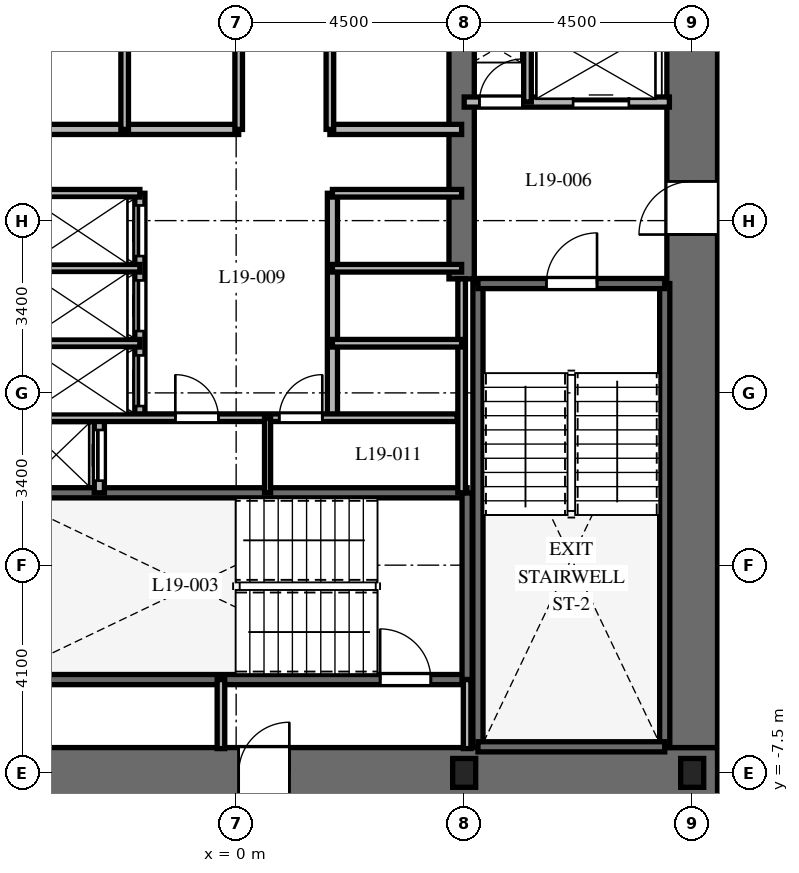
"""IFC4 building model, lengths in metres.
Left out: names, types, materials, properties, quantities, classifications, styles, units other than length and angle.
Written with IfcOpenShell. Run it as: python <this file> out.ifc"""

import sys

from ifc_helpers import new_model, si_unit, direction, frame, frame_2d, origin, origin_2d, place, context, subcontext, project, spatial, rectangle, i_section, extrude, element, fill, save


model = new_model("IFC4")
c1 = context("Model", 3, precision=1e-05, world=origin(), true_north=direction((0.0, 1.0)))
c2 = subcontext(c1, "Body", "Model", "MODEL_VIEW")
j1 = project(units=[si_unit("LENGTHUNIT", "METRE"), si_unit("PLANEANGLEUNIT", "RADIAN")], contexts=[c1])
p1 = place(None, origin())
s1 = spatial("IfcSite", under=j1, at=p1, CompositionType="ELEMENT")
p2 = place(p1, origin())
s2 = spatial("IfcBuilding", under=s1, at=p2, CompositionType="ELEMENT")
p3 = place(p2, frame((0.0, 0.0, 82.3)))
s3 = spatial("IfcBuildingStorey", under=s2, at=p3, CompositionType="ELEMENT", Elevation=82.3)
p4 = place(p3, frame((-9.5, -7.5, 0.0), z_axis=(0.0, 0.0, 1.0), x_axis=(1.0, 0.0, 0.0)))
e1 = element("IfcWall", 1, at=p4, inside=s3, PredefinedType="SHEAR", context=c2, shape_type="SweptSolid", body=[
    extrude(rectangle(XDim=19.0, YDim=1.0, at=frame_2d((9.5, 0.0))), origin(), (0.0, 0.0, 1.0), 3.7),
])
p5 = place(p4, frame((9.55, 0.0, 0.0)))
e2 = element("IfcOpeningElement", 2, at=p5, cuts=e1, PredefinedType="OPENING", context=c2, shape_type="SweptSolid", body=[
    extrude(rectangle(XDim=1.0, YDim=2.15, at=frame_2d((0.5, 1.075))), frame((0.0, 0.51, 0.0), z_axis=(0.0, -1.0, 0.0), x_axis=(1.0, 0.0, 0.0)), (0.0, 0.0, 1.0), 1.02),
])
p6 = place(p3, frame((9.0, -7.0, 0.0), z_axis=(0.0, 0.0, 1.0), x_axis=(0.0, 1.0, 0.0)))
e3 = element("IfcWall", 3, at=p6, inside=s3, PredefinedType="SHEAR", context=c2, shape_type="SweptSolid", body=[
    extrude(rectangle(XDim=14.0, YDim=1.0, at=frame_2d((7.0, 0.0))), origin(), (0.0, 0.0, 1.0), 3.7),
])
p7 = place(p6, frame((10.125, 0.0, 0.0)))
e4 = element("IfcOpeningElement", 4, at=p7, cuts=e3, PredefinedType="OPENING", context=c2, shape_type="SweptSolid", body=[
    extrude(rectangle(XDim=1.05, YDim=2.15, at=frame_2d((0.525, 1.075))), frame((0.0, 0.51, 0.0), z_axis=(0.0, -1.0, 0.0), x_axis=(1.0, 0.0, 0.0)), (0.0, 0.0, 1.0), 1.02),
])
p8 = place(p3, frame((4.45, 2.25, 0.0), z_axis=(0.0, 0.0, 1.0), x_axis=(0.0, 1.0, 0.0)))
e5 = element("IfcWall", 5, at=p8, inside=s3, PredefinedType="SHEAR", context=c2, shape_type="SweptSolid", body=[
    extrude(rectangle(XDim=4.75, YDim=0.5, at=frame_2d((2.375, 0.0))), origin(), (0.0, 0.0, 1.0), 3.7),
])
for number, where, z_axis, x_axis in (
    (6, (4.772, -6.985, 0.0), (0.0, 0.0, 1.0), (0.0, 1.0, 0.0)),
    (7, (8.458, -6.985, 0.0), (0.0, 0.0, 1.0), (0.0, 1.0, 0.0)),
):
    element("IfcWall", number, at=place(p3, frame(where, z_axis=z_axis, x_axis=x_axis)), inside=s3, PredefinedType="SHEAR", context=c2, shape_type="SweptSolid", body=[
        extrude(rectangle(XDim=9.143, YDim=0.2, at=frame_2d((4.572, 0.0))), origin(), (0.0, 0.0, 1.0), 3.7),
    ])
p9 = place(p3, frame((4.772, -6.985, 0.0), z_axis=(0.0, 0.0, 1.0), x_axis=(1.0, 0.0, 0.0)))
e8 = element("IfcWall", 8, at=p9, inside=s3, PredefinedType="SHEAR", context=c2, shape_type="SweptSolid", body=[
    extrude(rectangle(XDim=3.686, YDim=0.2, at=frame_2d((1.843, 0.0))), origin(), (0.0, 0.0, 1.0), 3.7),
])
p10 = place(p3, frame((4.772, 2.158, 0.0), z_axis=(0.0, 0.0, 1.0), x_axis=(1.0, 0.0, 0.0)))
e9 = element("IfcWall", 9, at=p10, inside=s3, PredefinedType="SHEAR", context=c2, shape_type="SweptSolid", body=[
    extrude(rectangle(XDim=3.686, YDim=0.2, at=frame_2d((1.843, 0.0))), origin(), (0.0, 0.0, 1.0), 3.7),
])
p11 = place(p10, frame((1.35, 0.0, 0.0)))
e10 = element("IfcOpeningElement", 10, at=p11, cuts=e9, PredefinedType="OPENING", context=c2, shape_type="SweptSolid", body=[
    extrude(rectangle(XDim=1.0, YDim=2.15, at=frame_2d((0.5, 1.075))), frame((0.0, 0.11, 0.0), z_axis=(0.0, -1.0, 0.0), x_axis=(1.0, 0.0, 0.0)), (0.0, 0.0, 1.0), 0.22),
])
p12 = place(p3, frame((-4.608, -5.658, 0.0), z_axis=(0.0, 0.0, 1.0), x_axis=(1.0, 0.0, 0.0)))
e11 = element("IfcWall", 11, at=p12, inside=s3, PredefinedType="SHEAR", context=c2, shape_type="SweptSolid", body=[
    extrude(rectangle(XDim=9.166, YDim=0.2, at=frame_2d((4.583, 0.0))), origin(), (0.0, 0.0, 1.0), 3.7),
])
p13 = place(p12, frame((7.45, 0.0, 0.0)))
e12 = element("IfcOpeningElement", 12, at=p13, cuts=e11, PredefinedType="OPENING", context=c2, shape_type="SweptSolid", body=[
    extrude(rectangle(XDim=1.0, YDim=2.15, at=frame_2d((0.5, 1.075))), frame((0.0, 0.11, 0.0), z_axis=(0.0, -1.0, 0.0), x_axis=(1.0, 0.0, 0.0)), (0.0, 0.0, 1.0), 0.22),
])
p14 = place(p3, frame((-4.608, -1.972, 0.0), z_axis=(0.0, 0.0, 1.0), x_axis=(1.0, 0.0, 0.0)))
e13 = element("IfcWall", 13, at=p14, inside=s3, PredefinedType="SHEAR", context=c2, shape_type="SweptSolid", body=[
    extrude(rectangle(XDim=9.166, YDim=0.2, at=frame_2d((4.583, 0.0))), origin(), (0.0, 0.0, 1.0), 3.7),
])
p15 = place(p3, frame((4.558, -5.658, 0.0), z_axis=(0.0, 0.0, 1.0), x_axis=(0.0, 1.0, 0.0)))
e14 = element("IfcWall", 14, at=p15, inside=s3, PredefinedType="SHEAR", context=c2, shape_type="SweptSolid", body=[
    extrude(rectangle(XDim=3.686, YDim=0.2, at=frame_2d((1.843, 0.0))), origin(), (0.0, 0.0, 1.0), 3.7),
])
for number, where, z_axis, x_axis in (
    (15, (4.5, -7.5, 0.0), (0.0, 0.0, 1.0), (1.0, 0.0, 0.0)),
    (16, (9.0, -7.5, 0.0), (0.0, 0.0, 1.0), (1.0, 0.0, 0.0)),
):
    element("IfcColumn", number, at=place(p3, frame(where, z_axis=z_axis, x_axis=x_axis)), inside=s3, PredefinedType="COLUMN", context=c2, shape_type="SweptSolid", body=[
        extrude(i_section(OverallWidth=0.454, OverallDepth=0.569, WebThickness=0.078, FlangeThickness=0.125, at=origin_2d()), origin(), (0.0, 0.0, 1.0), 3.7),
    ])
for number, where, z_axis, x_axis in (
    (17, (-0.3, -7.02, 0.0), (0.0, 0.0, 1.0), (0.0, 1.0, 0.0)),
    (18, (4.558, -7.02, 0.0), (0.0, 0.0, 1.0), (0.0, 1.0, 0.0)),
):
    element("IfcWall", number, at=place(p3, frame(where, z_axis=z_axis, x_axis=x_axis)), inside=s3, PredefinedType="PARTITIONING", context=c2, shape_type="SweptSolid", body=[
        extrude(rectangle(XDim=1.362, YDim=0.15, at=frame_2d((0.681, 0.0))), origin(), (0.0, 0.0, 1.0), 3.38),
    ])
p16 = place(p3, frame((4.5, 5.74, 0.0), z_axis=(0.0, 0.0, 1.0), x_axis=(1.0, 0.0, 0.0)))
e19 = element("IfcWall", 19, at=p16, inside=s3, PredefinedType="PARTITIONING", context=c2, shape_type="SweptSolid", body=[
    extrude(rectangle(XDim=4.05, YDim=0.2, at=frame_2d((2.025, 0.0))), origin(), (0.0, 0.0, 1.0), 3.38),
])
p17 = place(p16, frame((0.3, 0.0, 0.0)))
e20 = element("IfcOpeningElement", 20, at=p17, cuts=e19, PredefinedType="OPENING", context=c2, shape_type="SweptSolid", body=[
    extrude(rectangle(XDim=0.85, YDim=2.03, at=frame_2d((0.425, 1.015))), frame((0.0, 0.11, 0.0), z_axis=(0.0, -1.0, 0.0), x_axis=(1.0, 0.0, 0.0)), (0.0, 0.0, 1.0), 0.22),
])
p18 = place(p16, frame((2.15, 0.0, 0.0)))
e21 = element("IfcOpeningElement", 21, at=p18, cuts=e19, PredefinedType="OPENING", context=c2, shape_type="SweptSolid", body=[
    extrude(rectangle(XDim=1.1, YDim=2.2, at=frame_2d((0.55, 1.1))), frame((0.0, 0.11, 0.0), z_axis=(0.0, -1.0, 0.0), x_axis=(1.0, 0.0, 0.0)), (0.0, 0.0, 1.0), 0.22),
])
p19 = place(p3, frame((5.75, 5.74, 0.0), z_axis=(0.0, 0.0, 1.0), x_axis=(0.0, 1.0, 0.0)))
e22 = element("IfcWall", 22, at=p19, inside=s3, PredefinedType="PARTITIONING", context=c2, shape_type="SweptSolid", body=[
    extrude(rectangle(XDim=1.41, YDim=0.15, at=frame_2d((0.705, 0.0))), origin(), (0.0, 0.0, 1.0), 3.38),
])
p20 = place(p3, frame((-2.7, -1.972, 0.0), z_axis=(0.0, 0.0, 1.0), x_axis=(0.0, 1.0, 0.0)))
e23 = element("IfcWall", 23, at=p20, inside=s3, PredefinedType="PARTITIONING", context=c2, shape_type="SweptSolid", body=[
    extrude(rectangle(XDim=1.472, YDim=0.2, at=frame_2d((0.736, 0.0))), origin(), (0.0, 0.0, 1.0), 3.38),
])
p21 = place(p20, frame((0.24, 0.0, 0.0)))
e24 = element("IfcOpeningElement", 24, at=p21, cuts=e23, PredefinedType="OPENING", context=c2, shape_type="SweptSolid", body=[
    extrude(rectangle(XDim=1.0, YDim=2.2, at=frame_2d((0.5, 1.1))), frame((0.0, 0.11, 0.0), z_axis=(0.0, -1.0, 0.0), x_axis=(1.0, 0.0, 0.0)), (0.0, 0.0, 1.0), 0.22),
])
p22 = place(p3, frame((-4.45, 5.2, 0.0), z_axis=(0.0, 0.0, 1.0), x_axis=(1.0, 0.0, 0.0)))
e25 = element("IfcWall", 25, at=p22, inside=s3, PredefinedType="PARTITIONING", context=c2, shape_type="SweptSolid", body=[
    extrude(rectangle(XDim=4.5, YDim=0.2, at=frame_2d((2.25, 0.0))), origin(), (0.0, 0.0, 1.0), 3.38),
])
p23 = place(p3, frame((1.85, 5.2, 0.0), z_axis=(0.0, 0.0, 1.0), x_axis=(1.0, 0.0, 0.0)))
e26 = element("IfcWall", 26, at=p23, inside=s3, PredefinedType="PARTITIONING", context=c2, shape_type="SweptSolid", body=[
    extrude(rectangle(XDim=2.6, YDim=0.2, at=frame_2d((1.3, 0.0))), origin(), (0.0, 0.0, 1.0), 3.38),
])
p24 = place(p3, frame((-2.2, 5.2, 0.0), z_axis=(0.0, 0.0, 1.0), x_axis=(0.0, 1.0, 0.0)))
e27 = element("IfcWall", 27, at=p24, inside=s3, PredefinedType="PARTITIONING", context=c2, shape_type="SweptSolid", body=[
    extrude(rectangle(XDim=1.85, YDim=0.15, at=frame_2d((0.925, 0.0))), origin(), (0.0, 0.0, 1.0), 3.38),
])
for number, where, z_axis, x_axis in (
    (28, (0.05, 5.2, 0.0), (0.0, 0.0, 1.0), (0.0, 1.0, 0.0)),
    (29, (1.85, 5.2, 0.0), (0.0, 0.0, 1.0), (0.0, 1.0, 0.0)),
):
    element("IfcWall", number, at=place(p3, frame(where, z_axis=z_axis, x_axis=x_axis)), inside=s3, PredefinedType="PARTITIONING", context=c2, shape_type="SweptSolid", body=[
        extrude(rectangle(XDim=1.95, YDim=0.15, at=frame_2d((0.975, 0.0))), origin(), (0.0, 0.0, 1.0), 3.38),
    ])
p25 = place(p3, frame((4.45, -1.972, 0.0), z_axis=(0.0, 0.0, 1.0), x_axis=(0.0, 1.0, 0.0)))
e30 = element("IfcWall", 30, at=p25, inside=s3, PredefinedType="PARTITIONING", context=c2, shape_type="SweptSolid", body=[
    extrude(rectangle(XDim=4.222, YDim=0.15, at=frame_2d((2.111, 0.0))), origin(), (0.0, 0.0, 1.0), 3.38),
])
p26 = place(p3, frame((-1.9, -0.5, 0.0), z_axis=(0.0, 0.0, 1.0), x_axis=(0.0, 1.0, 0.0)))
e31 = element("IfcWall", 31, at=p26, inside=s3, PredefinedType="PARTITIONING", context=c2, shape_type="SweptSolid", body=[
    extrude(rectangle(XDim=4.44, YDim=0.2, at=frame_2d((2.22, 0.0))), origin(), (0.0, 0.0, 1.0), 3.38),
])
p27 = place(p26, frame((0.24, 0.0, 0.0)))
e32 = element("IfcOpeningElement", 32, at=p27, cuts=e31, PredefinedType="OPENING", context=c2, shape_type="SweptSolid", body=[
    extrude(rectangle(XDim=1.0, YDim=2.2, at=frame_2d((0.5, 1.1))), frame((0.0, 0.11, 0.0), z_axis=(0.0, -1.0, 0.0), x_axis=(1.0, 0.0, 0.0)), (0.0, 0.0, 1.0), 0.22),
])
p28 = place(p26, frame((1.72, 0.0, 0.0)))
e33 = element("IfcOpeningElement", 33, at=p28, cuts=e31, PredefinedType="OPENING", context=c2, shape_type="SweptSolid", body=[
    extrude(rectangle(XDim=1.0, YDim=2.2, at=frame_2d((0.5, 1.1))), frame((0.0, 0.11, 0.0), z_axis=(0.0, -1.0, 0.0), x_axis=(1.0, 0.0, 0.0)), (0.0, 0.0, 1.0), 0.22),
])
p29 = place(p26, frame((3.2, 0.0, 0.0)))
e34 = element("IfcOpeningElement", 34, at=p29, cuts=e31, PredefinedType="OPENING", context=c2, shape_type="SweptSolid", body=[
    extrude(rectangle(XDim=1.0, YDim=2.2, at=frame_2d((0.5, 1.1))), frame((0.0, 0.11, 0.0), z_axis=(0.0, -1.0, 0.0), x_axis=(1.0, 0.0, 0.0)), (0.0, 0.0, 1.0), 0.22),
])
for number, where, z_axis, x_axis in (
    (35, (-4.45, 3.94, 0.0), (0.0, 0.0, 1.0), (1.0, 0.0, 0.0)),
    (36, (-4.45, 0.98, 0.0), (0.0, 0.0, 1.0), (1.0, 0.0, 0.0)),
    (37, (-4.45, 2.46, 0.0), (0.0, 0.0, 1.0), (1.0, 0.0, 0.0)),
):
    element("IfcWall", number, at=place(p3, frame(where, z_axis=z_axis, x_axis=x_axis)), inside=s3, PredefinedType="PARTITIONING", context=c2, shape_type="SweptSolid", body=[
        extrude(rectangle(XDim=2.55, YDim=0.15, at=frame_2d((1.275, 0.0))), origin(), (0.0, 0.0, 1.0), 3.38),
    ])
p30 = place(p3, frame((1.9, -0.5, 0.0), z_axis=(0.0, 0.0, 1.0), x_axis=(0.0, 1.0, 0.0)))
e38 = element("IfcWall", 38, at=p30, inside=s3, PredefinedType="PARTITIONING", context=c2, shape_type="SweptSolid", body=[
    extrude(rectangle(XDim=4.44, YDim=0.2, at=frame_2d((2.22, 0.0))), origin(), (0.0, 0.0, 1.0), 3.38),
])
for number, where, z_axis, x_axis in (
    (39, (1.9, 3.94, 0.0), (0.0, 0.0, 1.0), (1.0, 0.0, 0.0)),
    (40, (1.9, 0.98, 0.0), (0.0, 0.0, 1.0), (1.0, 0.0, 0.0)),
    (41, (1.9, 2.46, 0.0), (0.0, 0.0, 1.0), (1.0, 0.0, 0.0)),
):
    element("IfcWall", number, at=place(p3, frame(where, z_axis=z_axis, x_axis=x_axis)), inside=s3, PredefinedType="PARTITIONING", context=c2, shape_type="SweptSolid", body=[
        extrude(rectangle(XDim=2.55, YDim=0.15, at=frame_2d((1.275, 0.0))), origin(), (0.0, 0.0, 1.0), 3.38),
    ])
p31 = place(p3, frame((-4.36, -0.49, 0.0), z_axis=(0.0, 0.0, 1.0), x_axis=(1.0, 0.0, 0.0)))
e42 = element("IfcWall", 42, at=p31, inside=s3, PredefinedType="PARTITIONING", context=c2, shape_type="SweptSolid", body=[
    extrude(rectangle(XDim=8.72, YDim=0.15, at=frame_2d((4.36, 0.0))), origin(), (0.0, 0.0, 1.0), 3.38),
])
p32 = place(p31, frame((3.16, 0.0, 0.0)))
e43 = element("IfcOpeningElement", 43, at=p32, cuts=e42, PredefinedType="OPENING", context=c2, shape_type="SweptSolid", body=[
    extrude(rectangle(XDim=0.85, YDim=2.03, at=frame_2d((0.425, 1.015))), frame((0.0, 0.085, 0.0), z_axis=(0.0, -1.0, 0.0), x_axis=(1.0, 0.0, 0.0)), (0.0, 0.0, 1.0), 0.17),
])
p33 = place(p31, frame((5.21, 0.0, 0.0)))
e44 = element("IfcOpeningElement", 44, at=p33, cuts=e42, PredefinedType="OPENING", context=c2, shape_type="SweptSolid", body=[
    extrude(rectangle(XDim=0.85, YDim=2.03, at=frame_2d((0.425, 1.015))), frame((0.0, 0.085, 0.0), z_axis=(0.0, -1.0, 0.0), x_axis=(1.0, 0.0, 0.0)), (0.0, 0.0, 1.0), 0.17),
])
p34 = place(p3, frame((0.62, -1.972, 0.0), z_axis=(0.0, 0.0, 1.0), x_axis=(0.0, 1.0, 0.0)))
e45 = element("IfcWall", 45, at=p34, inside=s3, PredefinedType="PARTITIONING", context=c2, shape_type="SweptSolid", body=[
    extrude(rectangle(XDim=1.472, YDim=0.12, at=frame_2d((0.736, 0.0))), origin(), (0.0, 0.0, 1.0), 3.38),
])
p35 = place(p11, origin())
e46 = element("IfcDoor", 46, at=p35, inside=s3, OperationType="SINGLE_SWING_RIGHT", PredefinedType="DOOR", context=c2, shape_type="SweptSolid", body=[
    extrude(rectangle(XDim=1.0, YDim=2.15, at=frame_2d((0.5, 1.075))), frame((0.0, 0.025, 0.0), z_axis=(0.0, -1.0, 0.0), x_axis=(1.0, 0.0, 0.0)), (0.0, 0.0, 1.0), 0.05),
])
fill(e10, e46)
p36 = place(p13, origin())
e47 = element("IfcDoor", 47, at=p36, inside=s3, OperationType="SINGLE_SWING_LEFT", PredefinedType="DOOR", context=c2, shape_type="SweptSolid", body=[
    extrude(rectangle(XDim=1.0, YDim=2.15, at=frame_2d((0.5, 1.075))), frame((0.0, 0.025, 0.0), z_axis=(0.0, -1.0, 0.0), x_axis=(1.0, 0.0, 0.0)), (0.0, 0.0, 1.0), 0.05),
])
fill(e12, e47)
p37 = place(p5, origin())
e48 = element("IfcDoor", 48, at=p37, inside=s3, OperationType="SINGLE_SWING_RIGHT", PredefinedType="DOOR", context=c2, shape_type="SweptSolid", body=[
    extrude(rectangle(XDim=1.0, YDim=2.15, at=frame_2d((0.5, 1.075))), frame((0.0, 0.025, 0.0), z_axis=(0.0, -1.0, 0.0), x_axis=(1.0, 0.0, 0.0)), (0.0, 0.0, 1.0), 0.05),
])
fill(e2, e48)
p38 = place(p7, origin())
e49 = element("IfcDoor", 49, at=p38, inside=s3, OperationType="SINGLE_SWING_LEFT", PredefinedType="DOOR", context=c2, shape_type="SweptSolid", body=[
    extrude(rectangle(XDim=1.05, YDim=2.15, at=frame_2d((0.525, 1.075))), frame((0.0, 0.025, 0.0), z_axis=(0.0, -1.0, 0.0), x_axis=(1.0, 0.0, 0.0)), (0.0, 0.0, 1.0), 0.05),
])
fill(e4, e49)
p39 = place(p17, origin())
e50 = element("IfcDoor", 50, at=p39, inside=s3, OperationType="SINGLE_SWING_RIGHT", PredefinedType="DOOR", context=c2, shape_type="SweptSolid", body=[
    extrude(rectangle(XDim=0.85, YDim=2.03, at=frame_2d((0.425, 1.015))), frame((0.0, 0.025, 0.0), z_axis=(0.0, -1.0, 0.0), x_axis=(1.0, 0.0, 0.0)), (0.0, 0.0, 1.0), 0.05),
])
fill(e20, e50)
p40 = place(p18, origin())
e51 = element("IfcDoor", 51, at=p40, inside=s3, OperationType="SLIDING_TO_RIGHT", PredefinedType="DOOR", context=c2, shape_type="SweptSolid", body=[
    extrude(rectangle(XDim=1.1, YDim=2.2, at=frame_2d((0.55, 1.1))), frame((0.0, 0.025, 0.0), z_axis=(0.0, -1.0, 0.0), x_axis=(1.0, 0.0, 0.0)), (0.0, 0.0, 1.0), 0.05),
])
fill(e21, e51)
p41 = place(p21, origin())
e52 = element("IfcDoor", 52, at=p41, inside=s3, OperationType="SLIDING_TO_LEFT", PredefinedType="DOOR", context=c2, shape_type="SweptSolid", body=[
    extrude(rectangle(XDim=1.0, YDim=2.2, at=frame_2d((0.5, 1.1))), frame((0.0, 0.025, 0.0), z_axis=(0.0, -1.0, 0.0), x_axis=(1.0, 0.0, 0.0)), (0.0, 0.0, 1.0), 0.05),
])
fill(e24, e52)
p42 = place(p27, origin())
e53 = element("IfcDoor", 53, at=p42, inside=s3, OperationType="SLIDING_TO_LEFT", PredefinedType="DOOR", context=c2, shape_type="SweptSolid", body=[
    extrude(rectangle(XDim=1.0, YDim=2.2, at=frame_2d((0.5, 1.1))), frame((0.0, 0.025, 0.0), z_axis=(0.0, -1.0, 0.0), x_axis=(1.0, 0.0, 0.0)), (0.0, 0.0, 1.0), 0.05),
])
fill(e32, e53)
p43 = place(p28, origin())
e54 = element("IfcDoor", 54, at=p43, inside=s3, OperationType="SLIDING_TO_LEFT", PredefinedType="DOOR", context=c2, shape_type="SweptSolid", body=[
    extrude(rectangle(XDim=1.0, YDim=2.2, at=frame_2d((0.5, 1.1))), frame((0.0, 0.025, 0.0), z_axis=(0.0, -1.0, 0.0), x_axis=(1.0, 0.0, 0.0)), (0.0, 0.0, 1.0), 0.05),
])
fill(e33, e54)
p44 = place(p29, origin())
e55 = element("IfcDoor", 55, at=p44, inside=s3, OperationType="SLIDING_TO_LEFT", PredefinedType="DOOR", context=c2, shape_type="SweptSolid", body=[
    extrude(rectangle(XDim=1.0, YDim=2.2, at=frame_2d((0.5, 1.1))), frame((0.0, 0.025, 0.0), z_axis=(0.0, -1.0, 0.0), x_axis=(1.0, 0.0, 0.0)), (0.0, 0.0, 1.0), 0.05),
])
fill(e34, e55)
p45 = place(p32, origin())
e56 = element("IfcDoor", 56, at=p45, inside=s3, OperationType="SINGLE_SWING_LEFT", PredefinedType="DOOR", context=c2, shape_type="SweptSolid", body=[
    extrude(rectangle(XDim=0.85, YDim=2.03, at=frame_2d((0.425, 1.015))), frame((0.0, 0.025, 0.0), z_axis=(0.0, -1.0, 0.0), x_axis=(1.0, 0.0, 0.0)), (0.0, 0.0, 1.0), 0.05),
])
fill(e43, e56)
p46 = place(p33, origin())
e57 = element("IfcDoor", 57, at=p46, inside=s3, OperationType="SINGLE_SWING_RIGHT", PredefinedType="DOOR", context=c2, shape_type="SweptSolid", body=[
    extrude(rectangle(XDim=0.85, YDim=2.03, at=frame_2d((0.425, 1.015))), frame((0.0, 0.025, 0.0), z_axis=(0.0, -1.0, 0.0), x_axis=(1.0, 0.0, 0.0)), (0.0, 0.0, 1.0), 0.05),
])
fill(e44, e57)
save(model, sys.argv[1])
